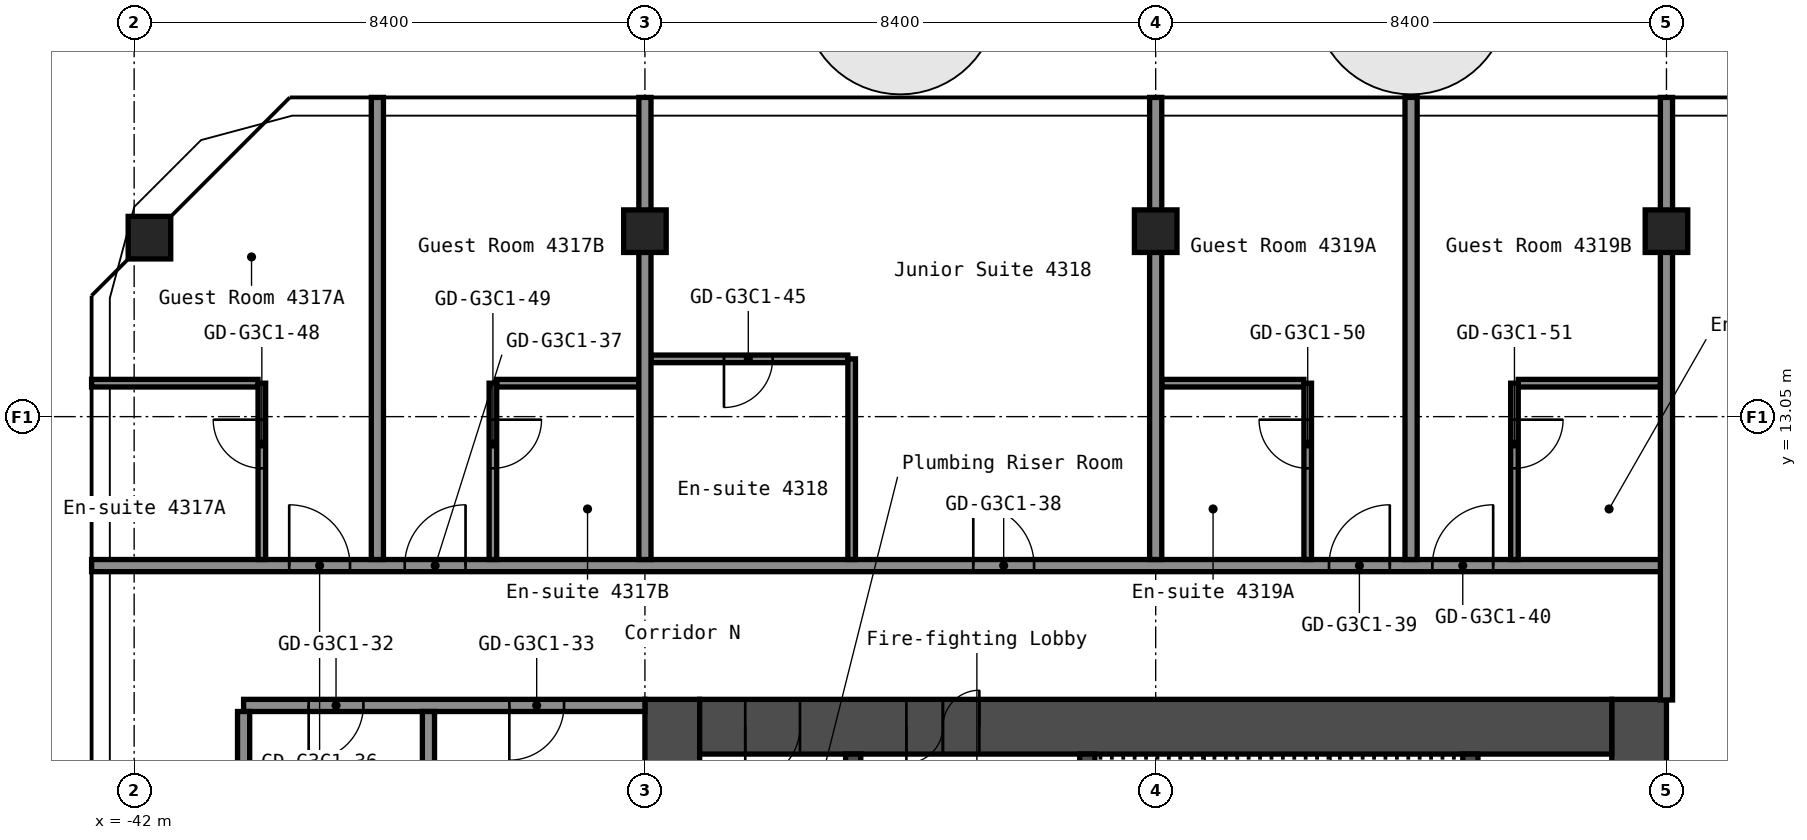
"""IFC4 building model, lengths in metres.
Left out: names, types, materials, properties, quantities, classifications, styles, units other than length and angle.
Written with IfcOpenShell. Run it as: python <this file> out.ifc"""

import sys

from ifc_helpers import new_model, si_unit, direction, frame, frame_2d, origin, origin_2d, place, context, subcontext, project, spatial, rectangle, hollow_rectangle, extrude, element, fill, save


model = new_model("IFC4")
c1 = context("Model", 3, precision=1e-05, world=origin(), true_north=direction((0.0, 1.0)))
c2 = subcontext(c1, "Body", "Model", "MODEL_VIEW")
j1 = project(units=[si_unit("LENGTHUNIT", "METRE"), si_unit("PLANEANGLEUNIT", "RADIAN")], contexts=[c1])
p1 = place(None, origin())
s1 = spatial("IfcSite", under=j1, at=p1, CompositionType="ELEMENT")
p2 = place(p1, origin())
s2 = spatial("IfcBuilding", under=s1, at=p2, CompositionType="ELEMENT")
p3 = place(p2, frame((0.0, 0.0, 153.4)))
s3 = spatial("IfcBuildingStorey", under=s2, at=p3, CompositionType="ELEMENT", Elevation=153.4)
for number, where, z_axis, x_axis in (
    (1, (-41.749, 15.994, 0.0), (0.0, 0.0, 1.0), (1.0, 0.0, 0.0)),
    (2, (-33.6, 16.1, 0.0), (0.0, 0.0, 1.0), (1.0, 0.0, 0.0)),
    (3, (-25.2, 16.1, 0.0), (0.0, 0.0, 1.0), (1.0, 0.0, 0.0)),
    (4, (-16.8, 16.1, 0.0), (0.0, 0.0, 1.0), (1.0, 0.0, 0.0)),
):
    element("IfcColumn", number, at=place(p3, frame(where, z_axis=z_axis, x_axis=x_axis)), inside=s3, PredefinedType="COLUMN", context=c2, shape_type="SweptSolid", body=[
        extrude(hollow_rectangle(XDim=0.7, YDim=0.7, WallThickness=0.028, at=origin_2d()), origin(), (0.0, 0.0, 1.0), 2.75),
    ])
p4 = place(p3, frame((-17.25, -8.4, 0.0), z_axis=(0.0, 0.0, 1.0), x_axis=(0.0, 1.0, 0.0)))
e5 = element("IfcWall", 5, at=p4, inside=s3, PredefinedType="SHEAR", context=c2, shape_type="SweptSolid", body=[
    extrude(rectangle(XDim=16.8, YDim=0.9, at=frame_2d((8.4, 0.0))), origin(), (0.0, 0.0, 1.0), 2.75),
])
p5 = place(p4, frame((7.1, 0.0, 0.0)))
e6 = element("IfcOpeningElement", 6, at=p5, cuts=e5, PredefinedType="OPENING", context=c2, shape_type="SweptSolid", body=[
    extrude(rectangle(XDim=1.6, YDim=2.1, at=frame_2d((0.8, 1.05))), frame((0.0, 0.46, 0.0), z_axis=(0.0, -1.0, 0.0), x_axis=(1.0, 0.0, 0.0)), (0.0, 0.0, 1.0), 0.92),
])
p6 = place(p3, frame((-33.15, -8.4, 0.0), z_axis=(0.0, 0.0, 1.0), x_axis=(0.0, 1.0, 0.0)))
e7 = element("IfcWall", 7, at=p6, inside=s3, PredefinedType="SHEAR", context=c2, shape_type="SweptSolid", body=[
    extrude(rectangle(XDim=16.8, YDim=0.9, at=frame_2d((8.4, 0.0))), origin(), (0.0, 0.0, 1.0), 2.75),
])
p7 = place(p3, frame((-32.7, 7.95, 0.0), z_axis=(0.0, 0.0, 1.0), x_axis=(1.0, 0.0, 0.0)))
e8 = element("IfcWall", 8, at=p7, inside=s3, PredefinedType="SHEAR", context=c2, shape_type="SweptSolid", body=[
    extrude(rectangle(XDim=15.0, YDim=0.9, at=frame_2d((7.5, 0.0))), origin(), (0.0, 0.0, 1.0), 2.75),
])
p8 = place(p7, frame((3.4, 0.0, 0.0)))
e9 = element("IfcOpeningElement", 9, at=p8, cuts=e8, PredefinedType="OPENING", context=c2, shape_type="SweptSolid", body=[
    extrude(rectangle(XDim=1.2, YDim=2.1, at=frame_2d((0.6, 1.05))), frame((0.0, 0.46, 0.0), z_axis=(0.0, -1.0, 0.0), x_axis=(1.0, 0.0, 0.0)), (0.0, 0.0, 1.0), 0.92),
])
p9 = place(p7, frame((0.75, 0.0, 0.0)))
e10 = element("IfcOpeningElement", 10, at=p9, cuts=e8, PredefinedType="OPENING", context=c2, shape_type="SweptSolid", body=[
    extrude(rectangle(XDim=0.9, YDim=2.1, at=frame_2d((0.45, 1.05))), frame((0.0, 0.46, 0.0), z_axis=(0.0, -1.0, 0.0), x_axis=(1.0, 0.0, 0.0)), (0.0, 0.0, 1.0), 0.92),
])
p10 = place(p3, frame((-20.025, 1.2, 0.0), z_axis=(0.0, 0.0, 1.0), x_axis=(0.0, 1.0, 0.0)))
e11 = element("IfcWall", 11, at=p10, inside=s3, PredefinedType="SHEAR", context=c2, shape_type="SweptSolid", body=[
    extrude(rectangle(XDim=6.3, YDim=0.25, at=frame_2d((3.15, 0.0))), origin(), (0.0, 0.0, 1.0), 2.75),
])
p11 = place(p3, frame((-26.325, 3.75, 0.0), z_axis=(0.0, 0.0, 1.0), x_axis=(0.0, 1.0, 0.0)))
e12 = element("IfcWall", 12, at=p11, inside=s3, PredefinedType="SHEAR", context=c2, shape_type="SweptSolid", body=[
    extrude(rectangle(XDim=3.75, YDim=0.25, at=frame_2d((1.875, 0.0))), origin(), (0.0, 0.0, 1.0), 2.75),
])
p12 = place(p11, frame((1.25, 0.0, 0.0)))
e13 = element("IfcOpeningElement", 13, at=p12, cuts=e12, PredefinedType="OPENING", context=c2, shape_type="SweptSolid", body=[
    extrude(rectangle(XDim=1.2, YDim=2.1, at=frame_2d((0.6, 1.05))), frame((0.0, 0.135, 0.0), z_axis=(0.0, -1.0, 0.0), x_axis=(1.0, 0.0, 0.0)), (0.0, 0.0, 1.0), 0.27),
])
p13 = place(p3, frame((-30.175, 1.45, 0.0), z_axis=(0.0, 0.0, 1.0), x_axis=(0.0, 1.0, 0.0)))
e14 = element("IfcWall", 14, at=p13, inside=s3, PredefinedType="SHEAR", context=c2, shape_type="SweptSolid", body=[
    extrude(rectangle(XDim=6.05, YDim=0.25, at=frame_2d((3.025, 0.0))), origin(), (0.0, 0.0, 1.0), 2.75),
])
p14 = place(p13, frame((2.625, 0.0, 0.0)))
e15 = element("IfcOpeningElement", 15, at=p14, cuts=e14, PredefinedType="OPENING", context=c2, shape_type="SweptSolid", body=[
    extrude(rectangle(XDim=1.1, YDim=2.1, at=frame_2d((0.55, 1.05))), frame((0.0, 0.135, 0.0), z_axis=(0.0, -1.0, 0.0), x_axis=(1.0, 0.0, 0.0)), (0.0, 0.0, 1.0), 0.27),
])
p15 = place(p3, frame((-40.2, 8.3, 0.0), z_axis=(0.0, 0.0, 1.0), x_axis=(1.0, 0.0, 0.0)))
e16 = element("IfcWall", 16, at=p15, inside=s3, PredefinedType="PARTITIONING", context=c2, shape_type="SweptSolid", body=[
    extrude(rectangle(XDim=6.6, YDim=0.2, at=frame_2d((3.3, 0.0))), origin(), (0.0, 0.0, 1.0), 2.75),
])
p16 = place(p15, frame((1.07, 0.0, 0.0)))
e17 = element("IfcOpeningElement", 17, at=p16, cuts=e16, PredefinedType="OPENING", context=c2, shape_type="SweptSolid", body=[
    extrude(rectangle(XDim=0.9, YDim=2.1, at=frame_2d((0.45, 1.05))), frame((0.0, 0.11, 0.0), z_axis=(0.0, -1.0, 0.0), x_axis=(1.0, 0.0, 0.0)), (0.0, 0.0, 1.0), 0.22),
])
p17 = place(p15, frame((4.37, 0.0, 0.0)))
e18 = element("IfcOpeningElement", 18, at=p17, cuts=e16, PredefinedType="OPENING", context=c2, shape_type="SweptSolid", body=[
    extrude(rectangle(XDim=0.9, YDim=2.1, at=frame_2d((0.45, 1.05))), frame((0.0, 0.11, 0.0), z_axis=(0.0, -1.0, 0.0), x_axis=(1.0, 0.0, 0.0)), (0.0, 0.0, 1.0), 0.22),
])
p18 = place(p3, frame((-42.7, 10.6, 0.0), z_axis=(0.0, 0.0, 1.0), x_axis=(1.0, 0.0, 0.0)))
e19 = element("IfcWall", 19, at=p18, inside=s3, PredefinedType="PARTITIONING", context=c2, shape_type="SweptSolid", body=[
    extrude(rectangle(XDim=25.9, YDim=0.2, at=frame_2d((12.95, 0.0))), origin(), (0.0, 0.0, 1.0), 2.75),
])
p19 = place(p18, frame((3.25, 0.0, 0.0)))
e20 = element("IfcOpeningElement", 20, at=p19, cuts=e19, PredefinedType="OPENING", context=c2, shape_type="SweptSolid", body=[
    extrude(rectangle(XDim=1.0, YDim=2.1, at=frame_2d((0.5, 1.05))), frame((0.0, 0.11, 0.0), z_axis=(0.0, -1.0, 0.0), x_axis=(1.0, 0.0, 0.0)), (0.0, 0.0, 1.0), 0.22),
])
p20 = place(p18, frame((5.15, 0.0, 0.0)))
e21 = element("IfcOpeningElement", 21, at=p20, cuts=e19, PredefinedType="OPENING", context=c2, shape_type="SweptSolid", body=[
    extrude(rectangle(XDim=1.0, YDim=2.1, at=frame_2d((0.5, 1.05))), frame((0.0, 0.11, 0.0), z_axis=(0.0, -1.0, 0.0), x_axis=(1.0, 0.0, 0.0)), (0.0, 0.0, 1.0), 0.22),
])
p21 = place(p18, frame((14.5, 0.0, 0.0)))
e22 = element("IfcOpeningElement", 22, at=p21, cuts=e19, PredefinedType="OPENING", context=c2, shape_type="SweptSolid", body=[
    extrude(rectangle(XDim=1.0, YDim=2.1, at=frame_2d((0.5, 1.05))), frame((0.0, 0.11, 0.0), z_axis=(0.0, -1.0, 0.0), x_axis=(1.0, 0.0, 0.0)), (0.0, 0.0, 1.0), 0.22),
])
p22 = place(p18, frame((20.35, 0.0, 0.0)))
e23 = element("IfcOpeningElement", 23, at=p22, cuts=e19, PredefinedType="OPENING", context=c2, shape_type="SweptSolid", body=[
    extrude(rectangle(XDim=1.0, YDim=2.1, at=frame_2d((0.5, 1.05))), frame((0.0, 0.11, 0.0), z_axis=(0.0, -1.0, 0.0), x_axis=(1.0, 0.0, 0.0)), (0.0, 0.0, 1.0), 0.22),
])
p23 = place(p18, frame((22.05, 0.0, 0.0)))
e24 = element("IfcOpeningElement", 24, at=p23, cuts=e19, PredefinedType="OPENING", context=c2, shape_type="SweptSolid", body=[
    extrude(rectangle(XDim=1.0, YDim=2.1, at=frame_2d((0.5, 1.05))), frame((0.0, 0.11, 0.0), z_axis=(0.0, -1.0, 0.0), x_axis=(1.0, 0.0, 0.0)), (0.0, 0.0, 1.0), 0.22),
])
p24 = place(p3, frame((-42.7, 13.6, 0.0), z_axis=(0.0, 0.0, 1.0), x_axis=(1.0, 0.0, 0.0)))
e25 = element("IfcWall", 25, at=p24, inside=s3, PredefinedType="PARTITIONING", context=c2, shape_type="SweptSolid", body=[
    extrude(rectangle(XDim=2.738, YDim=0.125, at=frame_2d((1.369, 0.0))), origin(), (0.0, 0.0, 1.0), 2.75),
])
for number, where, z_axis, x_axis in (
    (26, (-36.038, 13.6, 0.0), (0.0, 0.0, 1.0), (1.0, 0.0, 0.0)),
    (27, (-25.1, 13.6, 0.0), (0.0, 0.0, 1.0), (1.0, 0.0, 0.0)),
    (28, (-19.238, 13.6, 0.0), (0.0, 0.0, 1.0), (1.0, 0.0, 0.0)),
):
    element("IfcWall", number, at=place(p3, frame(where, z_axis=z_axis, x_axis=x_axis)), inside=s3, PredefinedType="PARTITIONING", context=c2, shape_type="SweptSolid", body=[
        extrude(rectangle(XDim=2.338, YDim=0.125, at=frame_2d((1.169, 0.0))), origin(), (0.0, 0.0, 1.0), 2.75),
    ])
p25 = place(p3, frame((-33.5, 14.0, 0.0), z_axis=(0.0, 0.0, 1.0), x_axis=(1.0, 0.0, 0.0)))
e29 = element("IfcWall", 29, at=p25, inside=s3, PredefinedType="PARTITIONING", context=c2, shape_type="SweptSolid", body=[
    extrude(rectangle(XDim=3.238, YDim=0.125, at=frame_2d((1.619, 0.0))), origin(), (0.0, 0.0, 1.0), 2.75),
])
p26 = place(p25, frame((1.2, 0.0, 0.0)))
e30 = element("IfcOpeningElement", 30, at=p26, cuts=e29, PredefinedType="OPENING", context=c2, shape_type="SweptSolid", body=[
    extrude(rectangle(XDim=0.8, YDim=2.1, at=frame_2d((0.4, 1.05))), frame((0.0, 0.073, 0.0), z_axis=(0.0, -1.0, 0.0), x_axis=(1.0, 0.0, 0.0)), (0.0, 0.0, 1.0), 0.145),
])
p27 = place(p3, frame((-40.2, -8.2, 0.0), z_axis=(0.0, 0.0, 1.0), x_axis=(0.0, 1.0, 0.0)))
e31 = element("IfcWall", 31, at=p27, inside=s3, PredefinedType="PARTITIONING", context=c2, shape_type="SweptSolid", body=[
    extrude(rectangle(XDim=16.4, YDim=0.2, at=frame_2d((8.2, 0.0))), origin(), (0.0, 0.0, 1.0), 2.75),
])
p28 = place(p3, frame((-39.9, 10.7, 0.0), z_axis=(0.0, 0.0, 1.0), x_axis=(0.0, 1.0, 0.0)))
e32 = element("IfcWall", 32, at=p28, inside=s3, PredefinedType="PARTITIONING", context=c2, shape_type="SweptSolid", body=[
    extrude(rectangle(XDim=2.9, YDim=0.125, at=frame_2d((1.45, 0.0))), origin(), (0.0, 0.0, 1.0), 2.75),
])
p29 = place(p28, frame((1.5, 0.0, 0.0)))
e33 = element("IfcOpeningElement", 33, at=p29, cuts=e32, PredefinedType="OPENING", context=c2, shape_type="SweptSolid", body=[
    extrude(rectangle(XDim=0.8, YDim=2.1, at=frame_2d((0.4, 1.05))), frame((0.0, 0.073, 0.0), z_axis=(0.0, -1.0, 0.0), x_axis=(1.0, 0.0, 0.0)), (0.0, 0.0, 1.0), 0.145),
])
p30 = place(p3, frame((-38.0, 10.7, 0.0), z_axis=(0.0, 0.0, 1.0), x_axis=(0.0, 1.0, 0.0)))
e34 = element("IfcWall", 34, at=p30, inside=s3, PredefinedType="PARTITIONING", context=c2, shape_type="SweptSolid", body=[
    extrude(rectangle(XDim=7.6, YDim=0.2, at=frame_2d((3.8, 0.0))), origin(), (0.0, 0.0, 1.0), 2.75),
])
p31 = place(p3, frame((-37.16, 0.0, 0.0), z_axis=(0.0, 0.0, 1.0), x_axis=(0.0, 1.0, 0.0)))
e35 = element("IfcWall", 35, at=p31, inside=s3, PredefinedType="PARTITIONING", context=c2, shape_type="SweptSolid", body=[
    extrude(rectangle(XDim=8.2, YDim=0.2, at=frame_2d((4.1, 0.0))), origin(), (0.0, 0.0, 1.0), 2.75),
])
p32 = place(p3, frame((-36.1, 10.7, 0.0), z_axis=(0.0, 0.0, 1.0), x_axis=(0.0, 1.0, 0.0)))
e36 = element("IfcWall", 36, at=p32, inside=s3, PredefinedType="PARTITIONING", context=c2, shape_type="SweptSolid", body=[
    extrude(rectangle(XDim=2.9, YDim=0.125, at=frame_2d((1.45, 0.0))), origin(), (0.0, 0.0, 1.0), 2.75),
])
p33 = place(p32, frame((1.5, 0.0, 0.0)))
e37 = element("IfcOpeningElement", 37, at=p33, cuts=e36, PredefinedType="OPENING", context=c2, shape_type="SweptSolid", body=[
    extrude(rectangle(XDim=0.8, YDim=2.1, at=frame_2d((0.4, 1.05))), frame((0.0, 0.073, 0.0), z_axis=(0.0, -1.0, 0.0), x_axis=(1.0, 0.0, 0.0)), (0.0, 0.0, 1.0), 0.145),
])
p34 = place(p3, frame((-33.6, 10.7, 0.0), z_axis=(0.0, 0.0, 1.0), x_axis=(0.0, 1.0, 0.0)))
e38 = element("IfcWall", 38, at=p34, inside=s3, PredefinedType="PARTITIONING", context=c2, shape_type="SweptSolid", body=[
    extrude(rectangle(XDim=7.6, YDim=0.2, at=frame_2d((3.8, 0.0))), origin(), (0.0, 0.0, 1.0), 2.75),
])
p35 = place(p3, frame((-30.2, 10.7, 0.0), z_axis=(0.0, 0.0, 1.0), x_axis=(0.0, 1.0, 0.0)))
e39 = element("IfcWall", 39, at=p35, inside=s3, PredefinedType="PARTITIONING", context=c2, shape_type="SweptSolid", body=[
    extrude(rectangle(XDim=3.3, YDim=0.125, at=frame_2d((1.65, 0.0))), origin(), (0.0, 0.0, 1.0), 2.75),
])
p36 = place(p3, frame((-25.2, 10.7, 0.0), z_axis=(0.0, 0.0, 1.0), x_axis=(0.0, 1.0, 0.0)))
e40 = element("IfcWall", 40, at=p36, inside=s3, PredefinedType="PARTITIONING", context=c2, shape_type="SweptSolid", body=[
    extrude(rectangle(XDim=7.6, YDim=0.2, at=frame_2d((3.8, 0.0))), origin(), (0.0, 0.0, 1.0), 2.75),
])
p37 = place(p3, frame((-22.7, 10.7, 0.0), z_axis=(0.0, 0.0, 1.0), x_axis=(0.0, 1.0, 0.0)))
e41 = element("IfcWall", 41, at=p37, inside=s3, PredefinedType="PARTITIONING", context=c2, shape_type="SweptSolid", body=[
    extrude(rectangle(XDim=2.9, YDim=0.125, at=frame_2d((1.45, 0.0))), origin(), (0.0, 0.0, 1.0), 2.75),
])
p38 = place(p37, frame((1.5, 0.0, 0.0)))
e42 = element("IfcOpeningElement", 42, at=p38, cuts=e41, PredefinedType="OPENING", context=c2, shape_type="SweptSolid", body=[
    extrude(rectangle(XDim=0.8, YDim=2.1, at=frame_2d((0.4, 1.05))), frame((0.0, 0.073, 0.0), z_axis=(0.0, -1.0, 0.0), x_axis=(1.0, 0.0, 0.0)), (0.0, 0.0, 1.0), 0.145),
])
p39 = place(p3, frame((-21.0, 10.7, 0.0), z_axis=(0.0, 0.0, 1.0), x_axis=(0.0, 1.0, 0.0)))
e43 = element("IfcWall", 43, at=p39, inside=s3, PredefinedType="PARTITIONING", context=c2, shape_type="SweptSolid", body=[
    extrude(rectangle(XDim=7.6, YDim=0.2, at=frame_2d((3.8, 0.0))), origin(), (0.0, 0.0, 1.0), 2.75),
])
p40 = place(p3, frame((-19.3, 10.7, 0.0), z_axis=(0.0, 0.0, 1.0), x_axis=(0.0, 1.0, 0.0)))
e44 = element("IfcWall", 44, at=p40, inside=s3, PredefinedType="PARTITIONING", context=c2, shape_type="SweptSolid", body=[
    extrude(rectangle(XDim=2.9, YDim=0.125, at=frame_2d((1.45, 0.0))), origin(), (0.0, 0.0, 1.0), 2.75),
])
p41 = place(p40, frame((1.5, 0.0, 0.0)))
e45 = element("IfcOpeningElement", 45, at=p41, cuts=e44, PredefinedType="OPENING", context=c2, shape_type="SweptSolid", body=[
    extrude(rectangle(XDim=0.8, YDim=2.1, at=frame_2d((0.4, 1.05))), frame((0.0, 0.073, 0.0), z_axis=(0.0, -1.0, 0.0), x_axis=(1.0, 0.0, 0.0)), (0.0, 0.0, 1.0), 0.145),
])
p42 = place(p3, frame((-16.8, 8.39, 0.0), z_axis=(0.0, 0.0, 1.0), x_axis=(0.0, 1.0, 0.0)))
e46 = element("IfcWall", 46, at=p42, inside=s3, PredefinedType="PARTITIONING", context=c2, shape_type="SweptSolid", body=[
    extrude(rectangle(XDim=9.91, YDim=0.2, at=frame_2d((4.955, 0.0))), origin(), (0.0, 0.0, 1.0), 2.75),
])
p43 = place(p8, origin())
e47 = element("IfcDoor", 47, at=p43, inside=s3, OperationType="DOUBLE_DOOR_SINGLE_SWING", PredefinedType="DOOR", context=c2, shape_type="SweptSolid", body=[
    extrude(rectangle(XDim=1.2, YDim=2.1, at=frame_2d((0.6, 1.05))), frame((0.0, 0.025, 0.0), z_axis=(0.0, -1.0, 0.0), x_axis=(1.0, 0.0, 0.0)), (0.0, 0.0, 1.0), 0.05),
])
fill(e9, e47)
p44 = place(p9, origin())
e48 = element("IfcDoor", 48, at=p44, inside=s3, OperationType="SINGLE_SWING_LEFT", PredefinedType="DOOR", context=c2, shape_type="SweptSolid", body=[
    extrude(rectangle(XDim=0.9, YDim=2.1, at=frame_2d((0.45, 1.05))), frame((0.0, 0.025, 0.0), z_axis=(0.0, -1.0, 0.0), x_axis=(1.0, 0.0, 0.0)), (0.0, 0.0, 1.0), 0.05),
])
fill(e10, e48)
p45 = place(p16, origin())
e49 = element("IfcDoor", 49, at=p45, inside=s3, OperationType="SINGLE_SWING_LEFT", PredefinedType="DOOR", context=c2, shape_type="SweptSolid", body=[
    extrude(rectangle(XDim=0.9, YDim=2.1, at=frame_2d((0.45, 1.05))), frame((0.0, 0.025, 0.0), z_axis=(0.0, -1.0, 0.0), x_axis=(1.0, 0.0, 0.0)), (0.0, 0.0, 1.0), 0.05),
])
fill(e17, e49)
p46 = place(p17, origin())
e50 = element("IfcDoor", 50, at=p46, inside=s3, OperationType="SINGLE_SWING_LEFT", PredefinedType="DOOR", context=c2, shape_type="SweptSolid", body=[
    extrude(rectangle(XDim=0.9, YDim=2.1, at=frame_2d((0.45, 1.05))), frame((0.0, 0.025, 0.0), z_axis=(0.0, -1.0, 0.0), x_axis=(1.0, 0.0, 0.0)), (0.0, 0.0, 1.0), 0.05),
])
fill(e18, e50)
p47 = place(p19, origin())
e51 = element("IfcDoor", 51, at=p47, inside=s3, OperationType="SINGLE_SWING_RIGHT", PredefinedType="DOOR", context=c2, shape_type="SweptSolid", body=[
    extrude(rectangle(XDim=1.0, YDim=2.1, at=frame_2d((0.5, 1.05))), frame((0.0, 0.025, 0.0), z_axis=(0.0, -1.0, 0.0), x_axis=(1.0, 0.0, 0.0)), (0.0, 0.0, 1.0), 0.05),
])
fill(e20, e51)
p48 = place(p20, origin())
e52 = element("IfcDoor", 52, at=p48, inside=s3, OperationType="SINGLE_SWING_LEFT", PredefinedType="DOOR", context=c2, shape_type="SweptSolid", body=[
    extrude(rectangle(XDim=1.0, YDim=2.1, at=frame_2d((0.5, 1.05))), frame((0.0, 0.025, 0.0), z_axis=(0.0, -1.0, 0.0), x_axis=(1.0, 0.0, 0.0)), (0.0, 0.0, 1.0), 0.05),
])
fill(e21, e52)
p49 = place(p21, origin())
e53 = element("IfcDoor", 53, at=p49, inside=s3, OperationType="SINGLE_SWING_RIGHT", PredefinedType="DOOR", context=c2, shape_type="SweptSolid", body=[
    extrude(rectangle(XDim=1.0, YDim=2.1, at=frame_2d((0.5, 1.05))), frame((0.0, 0.025, 0.0), z_axis=(0.0, -1.0, 0.0), x_axis=(1.0, 0.0, 0.0)), (0.0, 0.0, 1.0), 0.05),
])
fill(e22, e53)
p50 = place(p22, origin())
e54 = element("IfcDoor", 54, at=p50, inside=s3, OperationType="SINGLE_SWING_LEFT", PredefinedType="DOOR", context=c2, shape_type="SweptSolid", body=[
    extrude(rectangle(XDim=1.0, YDim=2.1, at=frame_2d((0.5, 1.05))), frame((0.0, 0.025, 0.0), z_axis=(0.0, -1.0, 0.0), x_axis=(1.0, 0.0, 0.0)), (0.0, 0.0, 1.0), 0.05),
])
fill(e23, e54)
p51 = place(p23, origin())
e55 = element("IfcDoor", 55, at=p51, inside=s3, OperationType="SINGLE_SWING_LEFT", PredefinedType="DOOR", context=c2, shape_type="SweptSolid", body=[
    extrude(rectangle(XDim=1.0, YDim=2.1, at=frame_2d((0.5, 1.05))), frame((0.0, 0.025, 0.0), z_axis=(0.0, -1.0, 0.0), x_axis=(1.0, 0.0, 0.0)), (0.0, 0.0, 1.0), 0.05),
])
fill(e24, e55)
p52 = place(p26, origin())
e56 = element("IfcDoor", 56, at=p52, inside=s3, OperationType="SINGLE_SWING_LEFT", PredefinedType="DOOR", context=c2, shape_type="SweptSolid", body=[
    extrude(rectangle(XDim=0.8, YDim=2.1, at=frame_2d((0.4, 1.05))), frame((0.0, 0.025, 0.0), z_axis=(0.0, -1.0, 0.0), x_axis=(1.0, 0.0, 0.0)), (0.0, 0.0, 1.0), 0.05),
])
fill(e30, e56)
p53 = place(p29, origin())
e57 = element("IfcDoor", 57, at=p53, inside=s3, OperationType="SINGLE_SWING_LEFT", PredefinedType="DOOR", context=c2, shape_type="SweptSolid", body=[
    extrude(rectangle(XDim=0.8, YDim=2.1, at=frame_2d((0.4, 1.05))), frame((0.0, 0.025, 0.0), z_axis=(0.0, -1.0, 0.0), x_axis=(1.0, 0.0, 0.0)), (0.0, 0.0, 1.0), 0.05),
])
fill(e33, e57)
p54 = place(p33, origin())
e58 = element("IfcDoor", 58, at=p54, inside=s3, OperationType="SINGLE_SWING_RIGHT", PredefinedType="DOOR", context=c2, shape_type="SweptSolid", body=[
    extrude(rectangle(XDim=0.8, YDim=2.1, at=frame_2d((0.4, 1.05))), frame((0.0, 0.025, 0.0), z_axis=(0.0, -1.0, 0.0), x_axis=(1.0, 0.0, 0.0)), (0.0, 0.0, 1.0), 0.05),
])
fill(e37, e58)
p55 = place(p38, origin())
e59 = element("IfcDoor", 59, at=p55, inside=s3, OperationType="SINGLE_SWING_LEFT", PredefinedType="DOOR", context=c2, shape_type="SweptSolid", body=[
    extrude(rectangle(XDim=0.8, YDim=2.1, at=frame_2d((0.4, 1.05))), frame((0.0, 0.025, 0.0), z_axis=(0.0, -1.0, 0.0), x_axis=(1.0, 0.0, 0.0)), (0.0, 0.0, 1.0), 0.05),
])
fill(e42, e59)
p56 = place(p41, origin())
e60 = element("IfcDoor", 60, at=p56, inside=s3, OperationType="SINGLE_SWING_RIGHT", PredefinedType="DOOR", context=c2, shape_type="SweptSolid", body=[
    extrude(rectangle(XDim=0.8, YDim=2.1, at=frame_2d((0.4, 1.05))), frame((0.0, 0.025, 0.0), z_axis=(0.0, -1.0, 0.0), x_axis=(1.0, 0.0, 0.0)), (0.0, 0.0, 1.0), 0.05),
])
fill(e45, e60)
save(model, sys.argv[1])
